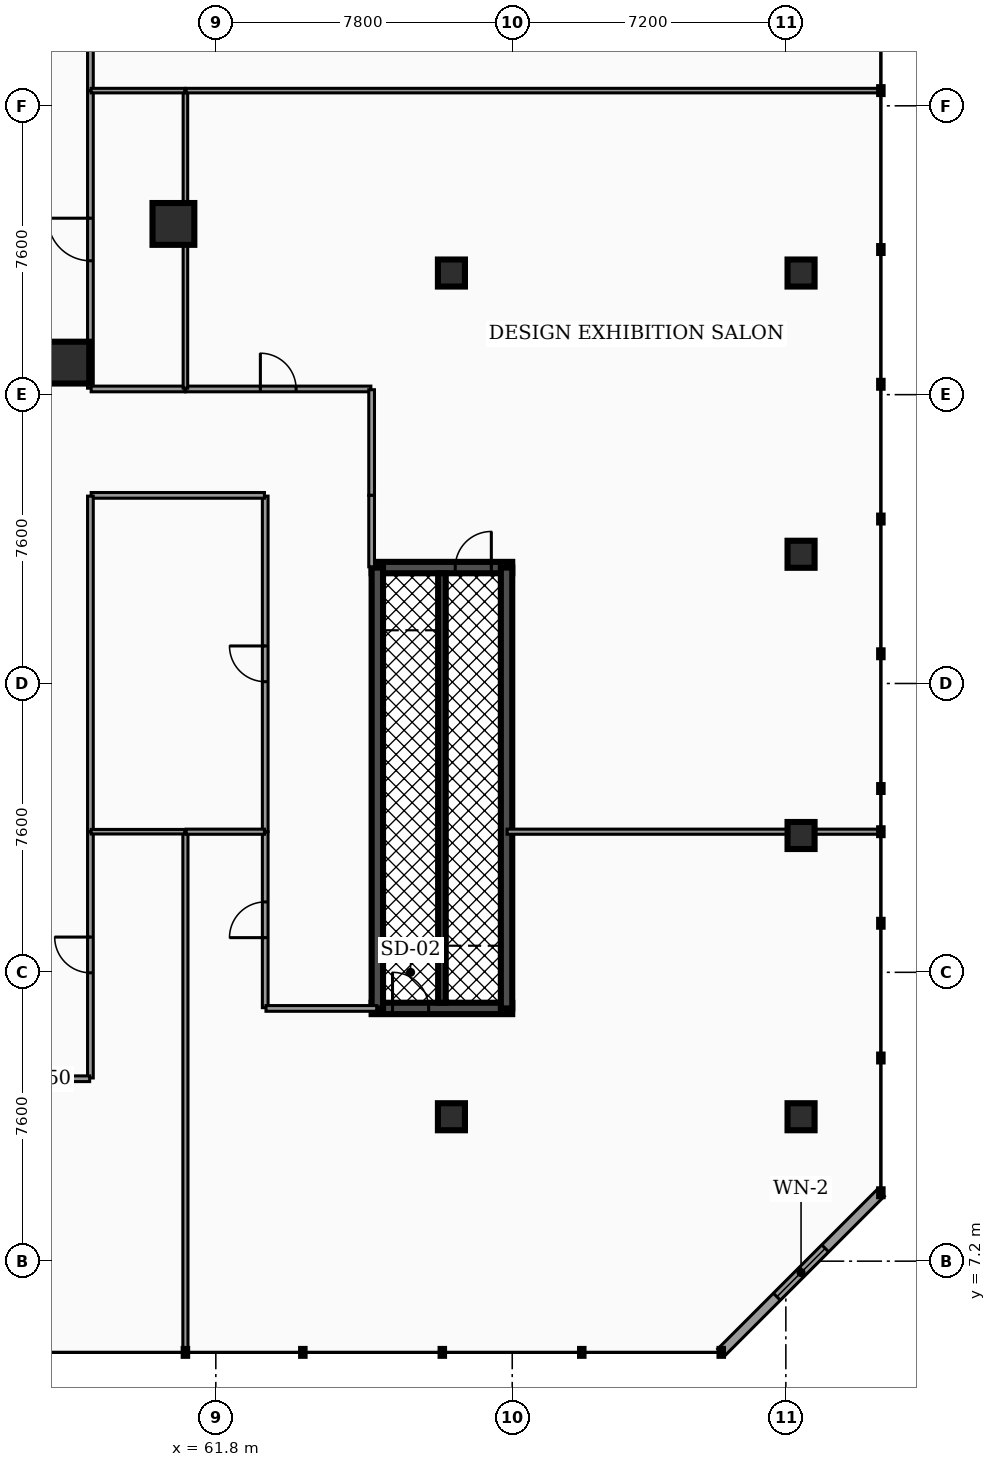
"""IFC4 building model, lengths in metres.
Left out: names, types, materials, properties, quantities, classifications, styles, units other than length and angle.
Written with IfcOpenShell. Run it as: python <this file> out.ifc"""

import sys

from ifc_helpers import new_model, si_unit, direction, frame, frame_2d, origin, origin_2d, place, context, subcontext, project, spatial, rectangle, hollow_rectangle, hollow_circle, extrude, element, fill, save


model = new_model("IFC4")
c1 = context("Model", 3, precision=1e-05, world=origin(), true_north=direction((0.0, 1.0)))
c2 = subcontext(c1, "Body", "Model", "MODEL_VIEW")
j1 = project(units=[si_unit("LENGTHUNIT", "METRE"), si_unit("PLANEANGLEUNIT", "RADIAN")], contexts=[c1])
p1 = place(None, origin())
s1 = spatial("IfcSite", under=j1, at=p1, CompositionType="ELEMENT")
p2 = place(p1, origin())
s2 = spatial("IfcBuilding", under=s1, at=p2, CompositionType="ELEMENT")
p3 = place(p2, frame((0.0, 0.0, 5.1)))
s3 = spatial("IfcBuildingStorey", under=s2, at=p3, CompositionType="ELEMENT", Elevation=5.1)
p4 = place(p3, frame((65.9, 25.45, 0.0), z_axis=(0.0, 0.0, 1.0), x_axis=(1.0, 0.0, 0.0)))
e1 = element("IfcWall", 1, at=p4, inside=s3, PredefinedType="SHEAR", context=c2, shape_type="SweptSolid", body=[
    extrude(rectangle(XDim=3.7, YDim=0.3, at=frame_2d((1.85, 0.0))), origin(), (0.0, 0.0, 1.0), 4.14),
])
p5 = place(p4, frame((2.2, 0.0, 0.0)))
e2 = element("IfcOpeningElement", 2, at=p5, cuts=e1, PredefinedType="OPENING", context=c2, shape_type="SweptSolid", body=[
    extrude(rectangle(XDim=0.95, YDim=2.2, at=frame_2d((0.475, 1.1))), frame((0.0, 0.16, 0.0), z_axis=(0.0, -1.0, 0.0), x_axis=(1.0, 0.0, 0.0)), (0.0, 0.0, 1.0), 0.32),
])
p6 = place(p3, frame((65.9, 13.85, 0.0), z_axis=(0.0, 0.0, 1.0), x_axis=(1.0, 0.0, 0.0)))
e3 = element("IfcWall", 3, at=p6, inside=s3, PredefinedType="SHEAR", context=c2, shape_type="SweptSolid", body=[
    extrude(rectangle(XDim=3.7, YDim=0.3, at=frame_2d((1.85, 0.0))), origin(), (0.0, 0.0, 1.0), 4.14),
])
p7 = place(p6, frame((0.55, 0.0, 0.0)))
e4 = element("IfcOpeningElement", 4, at=p7, cuts=e3, PredefinedType="OPENING", context=c2, shape_type="SweptSolid", body=[
    extrude(rectangle(XDim=0.95, YDim=2.2, at=frame_2d((0.475, 1.1))), frame((0.0, 0.16, 0.0), z_axis=(0.0, -1.0, 0.0), x_axis=(1.0, 0.0, 0.0)), (0.0, 0.0, 1.0), 0.32),
])
for number, where, z_axis, x_axis in (
    (5, (66.05, 13.85, 0.0), (0.0, 0.0, 1.0), (0.0, 1.0, 0.0)),
    (6, (69.45, 13.85, 0.0), (0.0, 0.0, 1.0), (0.0, 1.0, 0.0)),
):
    element("IfcWall", number, at=place(p3, frame(where, z_axis=z_axis, x_axis=x_axis)), inside=s3, PredefinedType="SHEAR", context=c2, shape_type="SweptSolid", body=[
        extrude(rectangle(XDim=11.6, YDim=0.3, at=frame_2d((5.8, 0.0))), origin(), (0.0, 0.0, 1.0), 4.14),
    ])
p8 = place(p3, frame((67.75, 14.0, 0.0), z_axis=(0.0, 0.0, 1.0), x_axis=(0.0, 1.0, 0.0)))
e7 = element("IfcWall", 7, at=p8, inside=s3, PredefinedType="SHEAR", context=c2, shape_type="SweptSolid", body=[
    extrude(rectangle(XDim=11.3, YDim=0.2, at=frame_2d((5.65, 0.0))), origin(), (0.0, 0.0, 1.0), 4.14),
])
for number, where, z_axis, x_axis in (
    (8, (57.92, 30.843, 0.0), (0.0, 0.0, 1.0), (1.0, 0.0, 0.0)),
    (9, (60.685, 34.492, 0.0), (0.0, 0.0, 1.0), (1.0, 0.0, 0.0)),
):
    element("IfcColumn", number, at=place(p3, frame(where, z_axis=z_axis, x_axis=x_axis)), inside=s3, PredefinedType="COLUMN", context=c2, shape_type="SweptSolid", body=[
        extrude(hollow_rectangle(XDim=1.1, YDim=1.1, WallThickness=0.055, at=origin_2d()), origin(), (0.0, 0.0, 1.0), 4.14),
    ])
p9 = place(p3, frame((77.2, 11.0, 0.0), z_axis=(0.0, 0.0, 1.0), x_axis=(1.0, 0.0, 0.0)))
e10 = element("IfcColumn", 10, at=p9, inside=s3, PredefinedType="COLUMN", context=c2, shape_type="SweptSolid", body=[
    extrude(hollow_circle(Radius=0.355, WallThickness=0.03, at=origin_2d()), origin(), (0.0, 0.0, 1.0), 4.11),
])
p10 = place(p3, frame((68.0, 11.0, 0.0), z_axis=(0.0, 0.0, 1.0), x_axis=(1.0, 0.0, 0.0)))
e11 = element("IfcColumn", 11, at=p10, inside=s3, PredefinedType="COLUMN", context=c2, shape_type="SweptSolid", body=[
    extrude(hollow_circle(Radius=0.355, WallThickness=0.03, at=origin_2d()), origin(), (0.0, 0.0, 1.0), 4.14),
])
p11 = place(p3, frame((77.2, 33.2, 0.0), z_axis=(0.0, 0.0, 1.0), x_axis=(1.0, 0.0, 0.0)))
e12 = element("IfcColumn", 12, at=p11, inside=s3, PredefinedType="COLUMN", context=c2, shape_type="SweptSolid", body=[
    extrude(hollow_circle(Radius=0.355, WallThickness=0.03, at=origin_2d()), origin(), (0.0, 0.0, 1.0), 4.11),
])
p12 = place(p3, frame((68.0, 33.2, 0.0), z_axis=(0.0, 0.0, 1.0), x_axis=(1.0, 0.0, 0.0)))
e13 = element("IfcColumn", 13, at=p12, inside=s3, PredefinedType="COLUMN", context=c2, shape_type="SweptSolid", body=[
    extrude(hollow_circle(Radius=0.355, WallThickness=0.03, at=origin_2d()), origin(), (0.0, 0.0, 1.0), 4.14),
])
for number, where, z_axis, x_axis in (
    (14, (77.2, 18.4, 0.0), (0.0, 0.0, 1.0), (1.0, 0.0, 0.0)),
    (15, (77.2, 25.8, 0.0), (0.0, 0.0, 1.0), (1.0, 0.0, 0.0)),
):
    element("IfcColumn", number, at=place(p3, frame(where, z_axis=z_axis, x_axis=x_axis)), inside=s3, PredefinedType="COLUMN", context=c2, shape_type="SweptSolid", body=[
        extrude(hollow_circle(Radius=0.355, WallThickness=0.03, at=origin_2d()), origin(), (0.0, 0.0, 1.0), 4.11),
    ])
p13 = place(p3, frame((75.1, 4.8, 0.0), z_axis=(0.0, 0.0, 1.0), x_axis=(0.707106781187, 0.707106781187, 0.0)))
e16 = element("IfcWall", 16, at=p13, inside=s3, PredefinedType="STANDARD", context=c2, shape_type="SweptSolid", body=[
    extrude(rectangle(XDim=5.94, YDim=0.26, at=frame_2d((2.97, 0.0))), origin(), (0.0, 0.0, 1.0), 3.65),
])
p14 = place(p13, frame((2.07, 0.0, 0.7)))
e17 = element("IfcOpeningElement", 17, at=p14, cuts=e16, PredefinedType="OPENING", context=c2, shape_type="SweptSolid", body=[
    extrude(rectangle(XDim=1.8, YDim=2.1, at=frame_2d((0.9, 1.05))), frame((0.0, 0.14, 0.0), z_axis=(0.0, -1.0, 0.0), x_axis=(1.0, 0.0, 0.0)), (0.0, 0.0, 1.0), 0.28),
])
p15 = place(p3, frame((58.5, 12.02, 0.0), z_axis=(0.0, 0.0, 1.0), x_axis=(0.0, 1.0, 0.0)))
e18 = element("IfcWall", 18, at=p15, inside=s3, PredefinedType="PARTITIONING", context=c2, shape_type="SweptSolid", body=[
    extrude(rectangle(XDim=6.475, YDim=0.15, at=frame_2d((3.238, 0.0))), origin(), (0.0, 0.0, 1.0), 3.097),
])
p16 = place(p15, frame((2.768, 0.0, 0.0)))
e19 = element("IfcOpeningElement", 19, at=p16, cuts=e18, PredefinedType="OPENING", context=c2, shape_type="SweptSolid", body=[
    extrude(rectangle(XDim=0.94, YDim=2.05, at=frame_2d((0.47, 1.025))), frame((0.0, 0.085, 0.0), z_axis=(0.0, -1.0, 0.0), x_axis=(1.0, 0.0, 0.0)), (0.0, 0.0, 1.0), 0.17),
])
p17 = place(p3, frame((55.52, 12.0, 0.0), z_axis=(0.0, 0.0, 1.0), x_axis=(1.0, 0.0, 0.0)))
e20 = element("IfcWall", 20, at=p17, inside=s3, PredefinedType="PARTITIONING", context=c2, shape_type="SweptSolid", body=[
    extrude(rectangle(XDim=2.96, YDim=0.15, at=frame_2d((1.48, 0.0))), origin(), (0.0, 0.0, 1.0), 3.097),
])
p18 = place(p3, frame((63.1, 13.87, 0.0), z_axis=(0.0, 0.0, 1.0), x_axis=(0.0, 1.0, 0.0)))
e21 = element("IfcWall", 21, at=p18, inside=s3, PredefinedType="PARTITIONING", context=c2, shape_type="SweptSolid", body=[
    extrude(rectangle(XDim=4.625, YDim=0.15, at=frame_2d((2.312, 0.0))), origin(), (0.0, 0.0, 1.0), 3.097),
])
p19 = place(p18, frame((1.843, 0.0, 0.0)))
e22 = element("IfcOpeningElement", 22, at=p19, cuts=e21, PredefinedType="OPENING", context=c2, shape_type="SweptSolid", body=[
    extrude(rectangle(XDim=0.94, YDim=2.05, at=frame_2d((0.47, 1.025))), frame((0.0, 0.085, 0.0), z_axis=(0.0, -1.0, 0.0), x_axis=(1.0, 0.0, 0.0)), (0.0, 0.0, 1.0), 0.17),
])
p20 = place(p3, frame((63.12, 13.85, 0.0), z_axis=(0.0, 0.0, 1.0), x_axis=(1.0, 0.0, 0.0)))
e23 = element("IfcWall", 23, at=p20, inside=s3, PredefinedType="PARTITIONING", context=c2, shape_type="SweptSolid", body=[
    extrude(rectangle(XDim=2.915, YDim=0.15, at=frame_2d((1.458, 0.0))), origin(), (0.0, 0.0, 1.0), 3.097),
])
p21 = place(p3, frame((63.1, 18.505, 0.0), z_axis=(0.0, 0.0, 1.0), x_axis=(0.0, 1.0, 0.0)))
e24 = element("IfcWall", 24, at=p21, inside=s3, PredefinedType="PARTITIONING", context=c2, shape_type="SweptSolid", body=[
    extrude(rectangle(XDim=8.825, YDim=0.15, at=frame_2d((4.413, 0.0))), origin(), (0.0, 0.0, 1.0), 3.097),
])
p22 = place(p21, frame((3.942, 0.0, 0.0)))
e25 = element("IfcOpeningElement", 25, at=p22, cuts=e24, PredefinedType="OPENING", context=c2, shape_type="SweptSolid", body=[
    extrude(rectangle(XDim=0.94, YDim=2.05, at=frame_2d((0.47, 1.025))), frame((0.0, 0.085, 0.0), z_axis=(0.0, -1.0, 0.0), x_axis=(1.0, 0.0, 0.0)), (0.0, 0.0, 1.0), 0.17),
])
p23 = place(p3, frame((58.52, 27.35, 0.0), z_axis=(0.0, 0.0, 1.0), x_axis=(1.0, 0.0, 0.0)))
e26 = element("IfcWall", 26, at=p23, inside=s3, PredefinedType="PARTITIONING", context=c2, shape_type="SweptSolid", body=[
    extrude(rectangle(XDim=4.56, YDim=0.15, at=frame_2d((2.28, 0.0))), origin(), (0.0, 0.0, 1.0), 3.097),
])
p24 = place(p3, frame((58.5, 18.505, 0.0), z_axis=(0.0, 0.0, 1.0), x_axis=(0.0, 1.0, 0.0)))
e27 = element("IfcWall", 27, at=p24, inside=s3, PredefinedType="PARTITIONING", context=c2, shape_type="SweptSolid", body=[
    extrude(rectangle(XDim=8.825, YDim=0.15, at=frame_2d((4.413, 0.0))), origin(), (0.0, 0.0, 1.0), 3.097),
])
p25 = place(p3, frame((61.005, 30.15, 0.0), z_axis=(0.0, 0.0, 1.0), x_axis=(1.0, 0.0, 0.0)))
e28 = element("IfcWall", 28, at=p25, inside=s3, PredefinedType="PARTITIONING", context=c2, shape_type="SweptSolid", body=[
    extrude(rectangle(XDim=4.875, YDim=0.15, at=frame_2d((2.438, 0.0))), origin(), (0.0, 0.0, 1.0), 3.097),
])
p26 = place(p25, frame((1.968, 0.0, 0.0)))
e29 = element("IfcOpeningElement", 29, at=p26, cuts=e28, PredefinedType="OPENING", context=c2, shape_type="SweptSolid", body=[
    extrude(rectangle(XDim=0.94, YDim=2.05, at=frame_2d((0.47, 1.025))), frame((0.0, 0.085, 0.0), z_axis=(0.0, -1.0, 0.0), x_axis=(1.0, 0.0, 0.0)), (0.0, 0.0, 1.0), 0.17),
])
p27 = place(p3, frame((65.9, 27.35, 0.0), z_axis=(0.0, 0.0, 1.0), x_axis=(0.0, 1.0, 0.0)))
e30 = element("IfcWall", 30, at=p27, inside=s3, PredefinedType="PARTITIONING", context=c2, shape_type="SweptSolid", body=[
    extrude(rectangle(XDim=2.78, YDim=0.15, at=frame_2d((1.39, 0.0))), origin(), (0.0, 0.0, 1.0), 3.097),
])
p28 = place(p3, frame((65.9, 25.47, 0.0), z_axis=(0.0, 0.0, 1.0), x_axis=(0.0, 1.0, 0.0)))
e31 = element("IfcWall", 31, at=p28, inside=s3, PredefinedType="PARTITIONING", context=c2, shape_type="SweptSolid", body=[
    extrude(rectangle(XDim=1.88, YDim=0.15, at=frame_2d((0.94, 0.0))), origin(), (0.0, 0.0, 1.0), 3.097),
])
p29 = place(p3, frame((58.5, 30.17, 0.0), z_axis=(0.0, 0.0, 1.0), x_axis=(0.0, 1.0, 0.0)))
e32 = element("IfcWall", 32, at=p29, inside=s3, PredefinedType="PARTITIONING", context=c2, shape_type="SweptSolid", body=[
    extrude(rectangle(XDim=7.825, YDim=0.15, at=frame_2d((3.913, 0.0))), origin(), (0.0, 0.0, 1.0), 3.097),
])
p30 = place(p29, frame((3.353, 0.0, 0.0)))
e33 = element("IfcOpeningElement", 33, at=p30, cuts=e32, PredefinedType="OPENING", context=c2, shape_type="SweptSolid", body=[
    extrude(rectangle(XDim=1.12, YDim=2.05, at=frame_2d((0.56, 1.025))), frame((0.0, 0.085, 0.0), z_axis=(0.0, -1.0, 0.0), x_axis=(1.0, 0.0, 0.0)), (0.0, 0.0, 1.0), 0.17),
])
p31 = place(p3, frame((58.52, 30.15, 0.0), z_axis=(0.0, 0.0, 1.0), x_axis=(1.0, 0.0, 0.0)))
e34 = element("IfcWall", 34, at=p31, inside=s3, PredefinedType="PARTITIONING", context=c2, shape_type="SweptSolid", body=[
    extrude(rectangle(XDim=2.475, YDim=0.15, at=frame_2d((1.238, 0.0))), origin(), (0.0, 0.0, 1.0), 3.097),
])
p32 = place(p3, frame((58.5, 38.005, 0.0), z_axis=(0.0, 0.0, 1.0), x_axis=(0.0, 1.0, 0.0)))
e35 = element("IfcWall", 35, at=p32, inside=s3, PredefinedType="PARTITIONING", context=c2, shape_type="SweptSolid", body=[
    extrude(rectangle(XDim=6.975, YDim=0.15, at=frame_2d((3.488, 0.0))), origin(), (0.0, 0.0, 1.0), 3.097),
])
p33 = place(p32, frame((3.018, 0.0, 0.0)))
e36 = element("IfcOpeningElement", 36, at=p33, cuts=e35, PredefinedType="OPENING", context=c2, shape_type="SweptSolid", body=[
    extrude(rectangle(XDim=0.94, YDim=2.05, at=frame_2d((0.47, 1.025))), frame((0.0, 0.085, 0.0), z_axis=(0.0, -1.0, 0.0), x_axis=(1.0, 0.0, 0.0)), (0.0, 0.0, 1.0), 0.17),
])
p34 = place(p3, frame((61.0, 4.815, 0.0), z_axis=(0.0, 0.0, 1.0), x_axis=(0.0, 1.0, 0.0)))
e37 = element("IfcWall", 37, at=p34, inside=s3, PredefinedType="PARTITIONING", context=c2, shape_type="SweptSolid", body=[
    extrude(rectangle(XDim=13.665, YDim=0.135, at=frame_2d((6.833, 0.0))), origin(), (0.0, 0.0, 1.0), 3.097),
])
p35 = place(p3, frame((58.52, 18.5, 0.0), z_axis=(0.0, 0.0, 1.0), x_axis=(1.0, 0.0, 0.0)))
e38 = element("IfcWall", 38, at=p35, inside=s3, PredefinedType="PARTITIONING", context=c2, shape_type="SweptSolid", body=[
    extrude(rectangle(XDim=2.46, YDim=0.12, at=frame_2d((1.23, 0.0))), origin(), (0.0, 0.0, 1.0), 3.097),
])
p36 = place(p3, frame((61.02, 18.5, 0.0), z_axis=(0.0, 0.0, 1.0), x_axis=(1.0, 0.0, 0.0)))
e39 = element("IfcWall", 39, at=p36, inside=s3, PredefinedType="PARTITIONING", context=c2, shape_type="SweptSolid", body=[
    extrude(rectangle(XDim=2.06, YDim=0.135, at=frame_2d((1.03, 0.0))), origin(), (0.0, 0.0, 1.0), 3.097),
])
p37 = place(p3, frame((69.465, 18.5, 0.0), z_axis=(0.0, 0.0, 1.0), x_axis=(1.0, 0.0, 0.0)))
e40 = element("IfcWall", 40, at=p37, inside=s3, PredefinedType="PARTITIONING", context=c2, shape_type="SweptSolid", body=[
    extrude(rectangle(XDim=9.82, YDim=0.135, at=frame_2d((4.91, 0.0))), origin(), (0.0, 0.0, 1.0), 3.097),
])
p38 = place(p3, frame((61.0, 30.17, 0.0), z_axis=(0.0, 0.0, 1.0), x_axis=(0.0, 1.0, 0.0)))
e41 = element("IfcWall", 41, at=p38, inside=s3, PredefinedType="PARTITIONING", context=c2, shape_type="SweptSolid", body=[
    extrude(rectangle(XDim=7.81, YDim=0.12, at=frame_2d((3.905, 0.0))), origin(), (0.0, 0.0, 1.0), 3.097),
])
p39 = place(p3, frame((61.02, 38.0, 0.0), z_axis=(0.0, 0.0, 1.0), x_axis=(1.0, 0.0, 0.0)))
e42 = element("IfcWall", 42, at=p39, inside=s3, PredefinedType="PARTITIONING", context=c2, shape_type="SweptSolid", body=[
    extrude(rectangle(XDim=18.265, YDim=0.12, at=frame_2d((9.132, 0.0))), origin(), (0.0, 0.0, 1.0), 3.097),
])
p40 = place(p3, frame((58.52, 38.0, 0.0), z_axis=(0.0, 0.0, 1.0), x_axis=(1.0, 0.0, 0.0)))
e43 = element("IfcWall", 43, at=p40, inside=s3, PredefinedType="PARTITIONING", context=c2, shape_type="SweptSolid", body=[
    extrude(rectangle(XDim=2.46, YDim=0.12, at=frame_2d((1.23, 0.0))), origin(), (0.0, 0.0, 1.0), 3.097),
])
p41 = place(p14, origin())
e44 = element("IfcWindow", 44, at=p41, inside=s3, PartitioningType="SINGLE_PANEL", PredefinedType="WINDOW", context=c2, shape_type="SweptSolid", body=[
    extrude(rectangle(XDim=1.8, YDim=2.1, at=frame_2d((0.9, 1.05))), frame((0.0, 0.03, 0.0), z_axis=(0.0, -1.0, 0.0), x_axis=(1.0, 0.0, 0.0)), (0.0, 0.0, 1.0), 0.06),
])
fill(e17, e44)
p42 = place(p7, origin())
e45 = element("IfcDoor", 45, at=p42, inside=s3, OperationType="SINGLE_SWING_LEFT", PredefinedType="DOOR", context=c2, shape_type="SweptSolid", body=[
    extrude(rectangle(XDim=0.95, YDim=2.2, at=frame_2d((0.475, 1.1))), frame((0.0, 0.025, 0.0), z_axis=(0.0, -1.0, 0.0), x_axis=(1.0, 0.0, 0.0)), (0.0, 0.0, 1.0), 0.05),
])
fill(e4, e45)
p43 = place(p5, origin())
e46 = element("IfcDoor", 46, at=p43, inside=s3, OperationType="SINGLE_SWING_RIGHT", PredefinedType="DOOR", context=c2, shape_type="SweptSolid", body=[
    extrude(rectangle(XDim=0.95, YDim=2.2, at=frame_2d((0.475, 1.1))), frame((0.0, 0.025, 0.0), z_axis=(0.0, -1.0, 0.0), x_axis=(1.0, 0.0, 0.0)), (0.0, 0.0, 1.0), 0.05),
])
fill(e2, e46)
p44 = place(p16, origin())
e47 = element("IfcDoor", 47, at=p44, inside=s3, OperationType="SINGLE_SWING_RIGHT", PredefinedType="DOOR", context=c2, shape_type="SweptSolid", body=[
    extrude(rectangle(XDim=0.94, YDim=2.05, at=frame_2d((0.47, 1.025))), frame((0.0, 0.025, 0.0), z_axis=(0.0, -1.0, 0.0), x_axis=(1.0, 0.0, 0.0)), (0.0, 0.0, 1.0), 0.05),
])
fill(e19, e47)
p45 = place(p19, origin())
e48 = element("IfcDoor", 48, at=p45, inside=s3, OperationType="SINGLE_SWING_LEFT", PredefinedType="DOOR", context=c2, shape_type="SweptSolid", body=[
    extrude(rectangle(XDim=0.94, YDim=2.05, at=frame_2d((0.47, 1.025))), frame((0.0, 0.025, 0.0), z_axis=(0.0, -1.0, 0.0), x_axis=(1.0, 0.0, 0.0)), (0.0, 0.0, 1.0), 0.05),
])
fill(e22, e48)
p46 = place(p22, origin())
e49 = element("IfcDoor", 49, at=p46, inside=s3, OperationType="SINGLE_SWING_RIGHT", PredefinedType="DOOR", context=c2, shape_type="SweptSolid", body=[
    extrude(rectangle(XDim=0.94, YDim=2.05, at=frame_2d((0.47, 1.025))), frame((0.0, 0.025, 0.0), z_axis=(0.0, -1.0, 0.0), x_axis=(1.0, 0.0, 0.0)), (0.0, 0.0, 1.0), 0.05),
])
fill(e25, e49)
p47 = place(p26, origin())
e50 = element("IfcDoor", 50, at=p47, inside=s3, OperationType="SINGLE_SWING_LEFT", PredefinedType="DOOR", context=c2, shape_type="SweptSolid", body=[
    extrude(rectangle(XDim=0.94, YDim=2.05, at=frame_2d((0.47, 1.025))), frame((0.0, 0.025, 0.0), z_axis=(0.0, -1.0, 0.0), x_axis=(1.0, 0.0, 0.0)), (0.0, 0.0, 1.0), 0.05),
])
fill(e29, e50)
p48 = place(p30, origin())
e51 = element("IfcDoor", 51, at=p48, inside=s3, OperationType="SINGLE_SWING_RIGHT", PredefinedType="DOOR", context=c2, shape_type="SweptSolid", body=[
    extrude(rectangle(XDim=1.12, YDim=2.05, at=frame_2d((0.56, 1.025))), frame((0.0, 0.025, 0.0), z_axis=(0.0, -1.0, 0.0), x_axis=(1.0, 0.0, 0.0)), (0.0, 0.0, 1.0), 0.05),
])
fill(e33, e51)
save(model, sys.argv[1])
